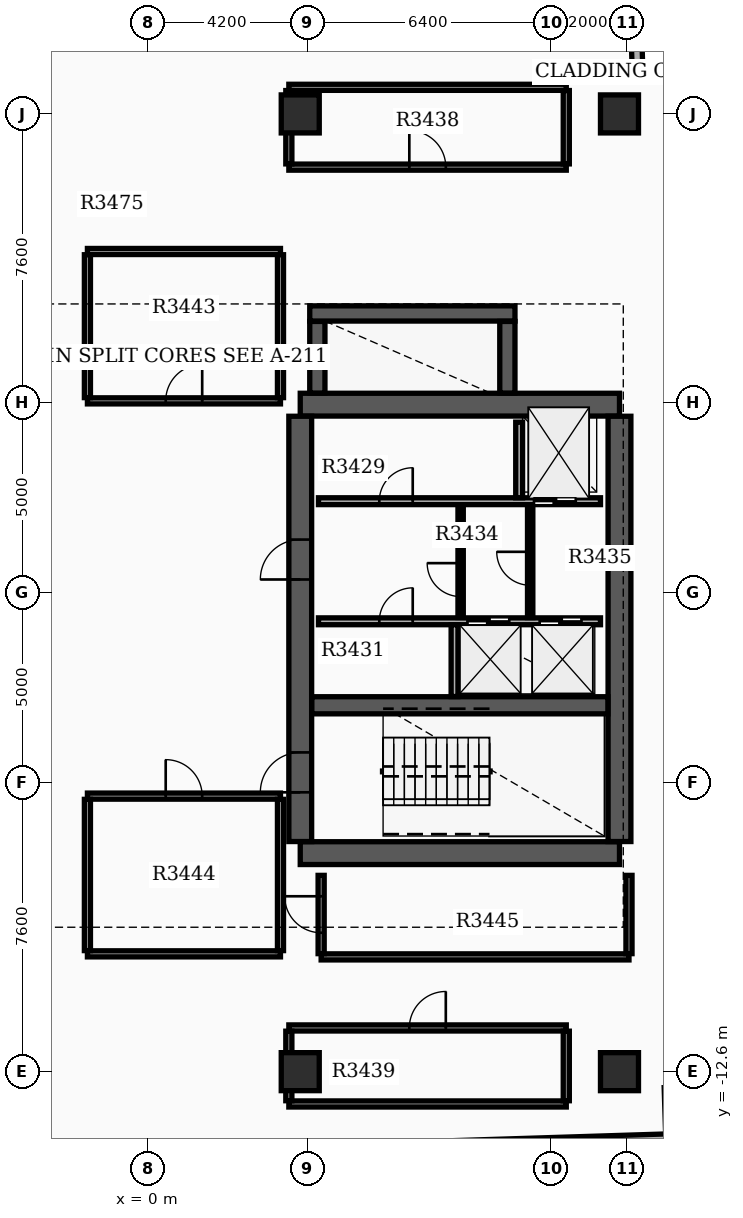
"""IFC4 building model, lengths in metres.
Left out: names, types, materials, properties, quantities, classifications, styles, units other than length and angle.
Written with IfcOpenShell. Run it as: python <this file> out.ifc"""

import sys

from ifc_helpers import new_model, si_unit, direction, frame, frame_2d, origin, origin_2d, place, context, subcontext, project, spatial, rectangle, extrude, element, fill, save


model = new_model("IFC4")
c1 = context("Model", 3, precision=1e-05, world=origin(), true_north=direction((0.0, 1.0)))
c2 = subcontext(c1, "Body", "Model", "MODEL_VIEW")
j1 = project(units=[si_unit("LENGTHUNIT", "METRE"), si_unit("PLANEANGLEUNIT", "RADIAN")], contexts=[c1])
p1 = place(None, origin())
s1 = spatial("IfcSite", under=j1, at=p1, CompositionType="ELEMENT")
p2 = place(p1, origin())
s2 = spatial("IfcBuilding", under=s1, at=p2, CompositionType="ELEMENT")
p3 = place(p2, frame((0.0, 0.0, 216.9)))
s3 = spatial("IfcBuildingStorey", under=s2, at=p3, CompositionType="ELEMENT", Elevation=216.9)
for number, where, z_axis, x_axis in (
    (1, (4.0, -6.85, 0.0), (0.0, 0.0, 1.0), (1.0, 0.0, 0.0)),
    (2, (4.0, 4.95, 0.0), (0.0, 0.0, 1.0), (1.0, 0.0, 0.0)),
):
    element("IfcWall", number, at=place(p3, frame(where, z_axis=z_axis, x_axis=x_axis)), inside=s3, PredefinedType="SHEAR", context=c2, shape_type="SweptSolid", body=[
        extrude(rectangle(XDim=8.4, YDim=0.6, at=frame_2d((4.2, 0.0))), origin(), (0.0, 0.0, 1.0), 3.7),
    ])
p4 = place(p3, frame((4.0, -6.545, 0.0), z_axis=(0.0, 0.0, 1.0), x_axis=(0.0, 1.0, 0.0)))
e3 = element("IfcWall", 3, at=p4, inside=s3, PredefinedType="SHEAR", context=c2, shape_type="SweptSolid", body=[
    extrude(rectangle(XDim=11.19, YDim=0.6, at=frame_2d((5.595, 0.0))), origin(), (0.0, 0.0, 1.0), 3.7),
])
p5 = place(p4, frame((1.295, 0.0, 0.0)))
e4 = element("IfcOpeningElement", 4, at=p5, cuts=e3, PredefinedType="OPENING", context=c2, shape_type="SweptSolid", body=[
    extrude(rectangle(XDim=1.05, YDim=2.15, at=frame_2d((0.525, 1.075))), frame((0.0, 0.31, 0.0), z_axis=(0.0, -1.0, 0.0), x_axis=(1.0, 0.0, 0.0)), (0.0, 0.0, 1.0), 0.62),
])
p6 = place(p4, frame((6.895, 0.0, 0.0)))
e5 = element("IfcOpeningElement", 5, at=p6, cuts=e3, PredefinedType="OPENING", context=c2, shape_type="SweptSolid", body=[
    extrude(rectangle(XDim=1.05, YDim=2.15, at=frame_2d((0.525, 1.075))), frame((0.0, 0.31, 0.0), z_axis=(0.0, -1.0, 0.0), x_axis=(1.0, 0.0, 0.0)), (0.0, 0.0, 1.0), 0.62),
])
p7 = place(p3, frame((12.4, -6.545, 0.0), z_axis=(0.0, 0.0, 1.0), x_axis=(0.0, 1.0, 0.0)))
e6 = element("IfcWall", 6, at=p7, inside=s3, PredefinedType="SHEAR", context=c2, shape_type="SweptSolid", body=[
    extrude(rectangle(XDim=11.19, YDim=0.6, at=frame_2d((5.595, 0.0))), origin(), (0.0, 0.0, 1.0), 3.7),
])
p8 = place(p3, frame((4.305, -2.96, 0.0), z_axis=(0.0, 0.0, 1.0), x_axis=(1.0, 0.0, 0.0)))
e7 = element("IfcWall", 7, at=p8, inside=s3, PredefinedType="SHEAR", context=c2, shape_type="SweptSolid", body=[
    extrude(rectangle(XDim=7.79, YDim=0.45, at=frame_2d((3.895, 0.0))), origin(), (0.0, 0.0, 1.0), 3.7),
])
p9 = place(p3, frame((4.45, 5.255, 0.0), z_axis=(0.0, 0.0, 1.0), x_axis=(0.0, 1.0, 0.0)))
e8 = element("IfcWall", 8, at=p9, inside=s3, PredefinedType="SHEAR", context=c2, shape_type="SweptSolid", body=[
    extrude(rectangle(XDim=1.885, YDim=0.4, at=frame_2d((0.942, 0.0))), origin(), (0.0, 0.0, 1.0), 3.7),
])
p10 = place(p3, frame((4.25, 7.35, 0.0), z_axis=(0.0, 0.0, 1.0), x_axis=(1.0, 0.0, 0.0)))
e9 = element("IfcWall", 9, at=p10, inside=s3, PredefinedType="SHEAR", context=c2, shape_type="SweptSolid", body=[
    extrude(rectangle(XDim=5.4, YDim=0.4, at=frame_2d((2.7, 0.0))), origin(), (0.0, 0.0, 1.0), 3.7),
])
p11 = place(p3, frame((9.45, 5.255, 0.0), z_axis=(0.0, 0.0, 1.0), x_axis=(0.0, 1.0, 0.0)))
e10 = element("IfcWall", 10, at=p11, inside=s3, PredefinedType="SHEAR", context=c2, shape_type="SweptSolid", body=[
    extrude(rectangle(XDim=1.885, YDim=0.4, at=frame_2d((0.942, 0.0))), origin(), (0.0, 0.0, 1.0), 3.7),
])
for number, where, z_axis, x_axis in (
    (11, (12.4, -12.6, 0.0), (0.0, 0.0, 1.0), (1.0, 0.0, 0.0)),
    (12, (12.4, 12.6, 0.0), (0.0, 0.0, 1.0), (1.0, 0.0, 0.0)),
    (13, (4.0, -12.6, 0.0), (0.0, 0.0, 1.0), (1.0, 0.0, 0.0)),
    (14, (4.0, 12.6, 0.0), (0.0, 0.0, 1.0), (1.0, 0.0, 0.0)),
):
    element("IfcColumn", number, at=place(p3, frame(where, z_axis=z_axis, x_axis=x_axis)), inside=s3, PredefinedType="COLUMN", context=c2, shape_type="SweptSolid", body=[
        extrude(rectangle(XDim=1.0, YDim=1.0, at=origin_2d()), origin(), (0.0, 0.0, 1.0), 3.9),
    ])
p12 = place(p3, frame((14.235, 13.754, 0.0), z_axis=(0.0, 0.0, 1.0), x_axis=(-0.999506398264, -0.031415916822, 0.0)))
e15 = element("IfcWall", 15, at=p12, inside=s3, PredefinedType="STANDARD", context=c2, shape_type="SweptSolid", body=[
    extrude(rectangle(XDim=1.22, YDim=0.28, at=frame_2d((0.61, 0.0))), origin(), (0.0, 0.0, 1.0), 3.18),
])
p13 = place(p3, frame((12.871, 13.851, 0.0), z_axis=(0.0, 0.0, 1.0), x_axis=(-0.031412596484, 0.999506502621, 0.0)))
e16 = element("IfcWall", 16, at=p13, inside=s3, PredefinedType="STANDARD", context=c2, shape_type="SweptSolid", body=[
    extrude(rectangle(XDim=1.5, YDim=0.28, at=frame_2d((0.75, 0.0))), origin(), (0.0, 0.0, 1.0), 3.18),
])
p14 = place(p3, frame((13.618, -14.379, 0.0), z_axis=(0.0, 0.0, 1.0), x_axis=(-0.999507224741, -0.031389611199, 0.0)))
e17 = element("IfcWall", 17, at=p14, inside=s3, PredefinedType="STANDARD", context=c2, shape_type="SweptSolid", body=[
    extrude(rectangle(XDim=6.3, YDim=0.28, at=frame_2d((3.15, 0.0))), origin(), (0.0, 0.0, 1.0), 3.18),
])
p15 = place(p3, frame((4.48, 2.41, 0.0), z_axis=(0.0, 0.0, 1.0), x_axis=(1.0, 0.0, 0.0)))
e18 = element("IfcWall", 18, at=p15, inside=s3, PredefinedType="SOLIDWALL", context=c2, shape_type="SweptSolid", body=[
    extrude(rectangle(XDim=7.42, YDim=0.18, at=frame_2d((3.71, 0.0))), origin(), (0.0, 0.0, 1.0), 3.17),
])
p16 = place(p15, frame((5.67, 0.0, 0.0)))
e19 = element("IfcOpeningElement", 19, at=p16, cuts=e18, PredefinedType="OPENING", context=c2, shape_type="SweptSolid", body=[
    extrude(rectangle(XDim=1.1, YDim=2.15, at=frame_2d((0.55, 1.075))), frame((0.0, 0.1, 0.0), z_axis=(0.0, -1.0, 0.0), x_axis=(1.0, 0.0, 0.0)), (0.0, 0.0, 1.0), 0.2),
])
p17 = place(p15, frame((1.6, 0.0, 0.0)))
e20 = element("IfcOpeningElement", 20, at=p17, cuts=e18, PredefinedType="OPENING", context=c2, shape_type="SweptSolid", body=[
    extrude(rectangle(XDim=0.88, YDim=2.1, at=frame_2d((0.44, 1.05))), frame((0.0, 0.1, 0.0), z_axis=(0.0, -1.0, 0.0), x_axis=(1.0, 0.0, 0.0)), (0.0, 0.0, 1.0), 0.2),
])
p18 = place(p3, frame((4.48, -0.75, 0.0), z_axis=(0.0, 0.0, 1.0), x_axis=(1.0, 0.0, 0.0)))
e21 = element("IfcWall", 21, at=p18, inside=s3, PredefinedType="SOLIDWALL", context=c2, shape_type="SweptSolid", body=[
    extrude(rectangle(XDim=7.42, YDim=0.18, at=frame_2d((3.71, 0.0))), origin(), (0.0, 0.0, 1.0), 3.17),
])
p19 = place(p18, frame((3.92, 0.0, 0.0)))
e22 = element("IfcOpeningElement", 22, at=p19, cuts=e21, PredefinedType="OPENING", context=c2, shape_type="SweptSolid", body=[
    extrude(rectangle(XDim=1.1, YDim=2.15, at=frame_2d((0.55, 1.075))), frame((0.0, 0.1, 0.0), z_axis=(0.0, -1.0, 0.0), x_axis=(1.0, 0.0, 0.0)), (0.0, 0.0, 1.0), 0.2),
])
p20 = place(p18, frame((5.82, 0.0, 0.0)))
e23 = element("IfcOpeningElement", 23, at=p20, cuts=e21, PredefinedType="OPENING", context=c2, shape_type="SweptSolid", body=[
    extrude(rectangle(XDim=1.1, YDim=2.15, at=frame_2d((0.55, 1.075))), frame((0.0, 0.1, 0.0), z_axis=(0.0, -1.0, 0.0), x_axis=(1.0, 0.0, 0.0)), (0.0, 0.0, 1.0), 0.2),
])
p21 = place(p18, frame((1.6, 0.0, 0.0)))
e24 = element("IfcOpeningElement", 24, at=p21, cuts=e21, PredefinedType="OPENING", context=c2, shape_type="SweptSolid", body=[
    extrude(rectangle(XDim=0.88, YDim=2.1, at=frame_2d((0.44, 1.05))), frame((0.0, 0.1, 0.0), z_axis=(0.0, -1.0, 0.0), x_axis=(1.0, 0.0, 0.0)), (0.0, 0.0, 1.0), 0.2),
])
p22 = place(p3, frame((9.76, 2.5, 0.0), z_axis=(0.0, 0.0, 1.0), x_axis=(0.0, 1.0, 0.0)))
e25 = element("IfcWall", 25, at=p22, inside=s3, PredefinedType="SOLIDWALL", context=c2, shape_type="SweptSolid", body=[
    extrude(rectangle(XDim=1.99, YDim=0.18, at=frame_2d((0.995, 0.0))), origin(), (0.0, 0.0, 1.0), 3.17),
])
p23 = place(p3, frame((8.06, -2.73, 0.0), z_axis=(0.0, 0.0, 1.0), x_axis=(0.0, 1.0, 0.0)))
e26 = element("IfcWall", 26, at=p23, inside=s3, PredefinedType="SOLIDWALL", context=c2, shape_type="SweptSolid", body=[
    extrude(rectangle(XDim=1.89, YDim=0.18, at=frame_2d((0.945, 0.0))), origin(), (0.0, 0.0, 1.0), 3.17),
])
p24 = place(p3, frame((8.22, -0.65, 0.0), z_axis=(0.0, 0.0, 1.0), x_axis=(0.0, 1.0, 0.0)))
e27 = element("IfcWall", 27, at=p24, inside=s3, PredefinedType="SOLIDWALL", context=c2, shape_type="SweptSolid", body=[
    extrude(rectangle(XDim=2.96, YDim=0.14, at=frame_2d((1.48, 0.0))), origin(), (0.0, 0.0, 1.0), 3.17),
])
p25 = place(p24, frame((0.55, 0.0, 0.0)))
e28 = element("IfcOpeningElement", 28, at=p25, cuts=e27, PredefinedType="OPENING", context=c2, shape_type="SweptSolid", body=[
    extrude(rectangle(XDim=0.88, YDim=2.1, at=frame_2d((0.44, 1.05))), frame((0.0, 0.08, 0.0), z_axis=(0.0, -1.0, 0.0), x_axis=(1.0, 0.0, 0.0)), (0.0, 0.0, 1.0), 0.16),
])
p26 = place(p3, frame((10.05, -0.652, 0.0), z_axis=(0.0, 0.0, 1.0), x_axis=(0.0, 1.0, 0.0)))
e29 = element("IfcWall", 29, at=p26, inside=s3, PredefinedType="PARTITIONING", context=c2, shape_type="SweptSolid", body=[
    extrude(rectangle(XDim=2.962, YDim=0.14, at=frame_2d((1.481, 0.0))), origin(), (0.0, 0.0, 1.0), 3.17),
])
p27 = place(p26, frame((0.85, 0.0, 0.0)))
e30 = element("IfcOpeningElement", 30, at=p27, cuts=e29, PredefinedType="OPENING", context=c2, shape_type="SweptSolid", body=[
    extrude(rectangle(XDim=0.88, YDim=2.1, at=frame_2d((0.44, 1.05))), frame((0.0, 0.08, 0.0), z_axis=(0.0, -1.0, 0.0), x_axis=(1.0, 0.0, 0.0)), (0.0, 0.0, 1.0), 0.16),
])
p28 = place(p3, frame((3.7, 11.2, 0.0), z_axis=(0.0, 0.0, 1.0), x_axis=(1.0, 0.0, 0.0)))
e31 = element("IfcWall", 31, at=p28, inside=s3, PredefinedType="PARTITIONING", context=c2, shape_type="SweptSolid", body=[
    extrude(rectangle(XDim=7.3, YDim=0.16, at=frame_2d((3.65, 0.0))), origin(), (0.0, 0.0, 1.0), 3.17),
])
p29 = place(p28, frame((3.17, 0.0, 0.0)))
e32 = element("IfcOpeningElement", 32, at=p29, cuts=e31, PredefinedType="OPENING", context=c2, shape_type="SweptSolid", body=[
    extrude(rectangle(XDim=0.96, YDim=2.15, at=frame_2d((0.48, 1.075))), frame((0.0, 0.09, 0.0), z_axis=(0.0, -1.0, 0.0), x_axis=(1.0, 0.0, 0.0)), (0.0, 0.0, 1.0), 0.18),
])
p30 = place(p3, frame((3.7, 13.3, 0.0), z_axis=(0.0, 0.0, 1.0), x_axis=(1.0, 0.0, 0.0)))
e33 = element("IfcWall", 33, at=p30, inside=s3, PredefinedType="PARTITIONING", context=c2, shape_type="SweptSolid", body=[
    extrude(rectangle(XDim=7.3, YDim=0.16, at=frame_2d((3.65, 0.0))), origin(), (0.0, 0.0, 1.0), 3.17),
])
for number, where, z_axis, x_axis in (
    (34, (3.7, 11.285, 0.0), (0.0, 0.0, 1.0), (0.0, 1.0, 0.0)),
    (35, (11.0, 11.285, 0.0), (0.0, 0.0, 1.0), (0.0, 1.0, 0.0)),
):
    element("IfcWall", number, at=place(p3, frame(where, z_axis=z_axis, x_axis=x_axis)), inside=s3, PredefinedType="PARTITIONING", context=c2, shape_type="SweptSolid", body=[
        extrude(rectangle(XDim=1.93, YDim=0.16, at=frame_2d((0.965, 0.0))), origin(), (0.0, 0.0, 1.0), 3.17),
    ])
p31 = place(p3, frame((3.7, -13.45, 0.0), z_axis=(0.0, 0.0, 1.0), x_axis=(1.0, 0.0, 0.0)))
e36 = element("IfcWall", 36, at=p31, inside=s3, PredefinedType="PARTITIONING", context=c2, shape_type="SweptSolid", body=[
    extrude(rectangle(XDim=7.3, YDim=0.16, at=frame_2d((3.65, 0.0))), origin(), (0.0, 0.0, 1.0), 3.17),
])
p32 = place(p3, frame((3.7, -11.45, 0.0), z_axis=(0.0, 0.0, 1.0), x_axis=(1.0, 0.0, 0.0)))
e37 = element("IfcWall", 37, at=p32, inside=s3, PredefinedType="PARTITIONING", context=c2, shape_type="SweptSolid", body=[
    extrude(rectangle(XDim=7.3, YDim=0.16, at=frame_2d((3.65, 0.0))), origin(), (0.0, 0.0, 1.0), 3.17),
])
p33 = place(p32, frame((3.17, 0.0, 0.0)))
e38 = element("IfcOpeningElement", 38, at=p33, cuts=e37, PredefinedType="OPENING", context=c2, shape_type="SweptSolid", body=[
    extrude(rectangle(XDim=0.96, YDim=2.15, at=frame_2d((0.48, 1.075))), frame((0.0, 0.09, 0.0), z_axis=(0.0, -1.0, 0.0), x_axis=(1.0, 0.0, 0.0)), (0.0, 0.0, 1.0), 0.18),
])
for number, where, z_axis, x_axis in (
    (39, (3.7, -13.365, 0.0), (0.0, 0.0, 1.0), (0.0, 1.0, 0.0)),
    (40, (11.0, -13.365, 0.0), (0.0, 0.0, 1.0), (0.0, 1.0, 0.0)),
):
    element("IfcWall", number, at=place(p3, frame(where, z_axis=z_axis, x_axis=x_axis)), inside=s3, PredefinedType="PARTITIONING", context=c2, shape_type="SweptSolid", body=[
        extrude(rectangle(XDim=1.83, YDim=0.16, at=frame_2d((0.915, 0.0))), origin(), (0.0, 0.0, 1.0), 3.17),
    ])
p34 = place(p3, frame((-1.6, 5.05, 0.0), z_axis=(0.0, 0.0, 1.0), x_axis=(1.0, 0.0, 0.0)))
e41 = element("IfcWall", 41, at=p34, inside=s3, PredefinedType="PARTITIONING", context=c2, shape_type="SweptSolid", body=[
    extrude(rectangle(XDim=5.08, YDim=0.16, at=frame_2d((2.54, 0.0))), origin(), (0.0, 0.0, 1.0), 3.17),
])
p35 = place(p34, frame((2.06, 0.0, 0.0)))
e42 = element("IfcOpeningElement", 42, at=p35, cuts=e41, PredefinedType="OPENING", context=c2, shape_type="SweptSolid", body=[
    extrude(rectangle(XDim=0.96, YDim=2.15, at=frame_2d((0.48, 1.075))), frame((0.0, 0.09, 0.0), z_axis=(0.0, -1.0, 0.0), x_axis=(1.0, 0.0, 0.0)), (0.0, 0.0, 1.0), 0.18),
])
p36 = place(p3, frame((-1.6, 8.98, 0.0), z_axis=(0.0, 0.0, 1.0), x_axis=(1.0, 0.0, 0.0)))
e43 = element("IfcWall", 43, at=p36, inside=s3, PredefinedType="PARTITIONING", context=c2, shape_type="SweptSolid", body=[
    extrude(rectangle(XDim=5.08, YDim=0.16, at=frame_2d((2.54, 0.0))), origin(), (0.0, 0.0, 1.0), 3.17),
])
for number, where, z_axis, x_axis in (
    (44, (-1.6, 5.135, 0.0), (0.0, 0.0, 1.0), (0.0, 1.0, 0.0)),
    (45, (3.48, 5.135, 0.0), (0.0, 0.0, 1.0), (0.0, 1.0, 0.0)),
):
    element("IfcWall", number, at=place(p3, frame(where, z_axis=z_axis, x_axis=x_axis)), inside=s3, PredefinedType="PARTITIONING", context=c2, shape_type="SweptSolid", body=[
        extrude(rectangle(XDim=3.76, YDim=0.16, at=frame_2d((1.88, 0.0))), origin(), (0.0, 0.0, 1.0), 3.17),
    ])
p37 = place(p3, frame((-1.6, -9.5, 0.0), z_axis=(0.0, 0.0, 1.0), x_axis=(1.0, 0.0, 0.0)))
e46 = element("IfcWall", 46, at=p37, inside=s3, PredefinedType="PARTITIONING", context=c2, shape_type="SweptSolid", body=[
    extrude(rectangle(XDim=5.08, YDim=0.16, at=frame_2d((2.54, 0.0))), origin(), (0.0, 0.0, 1.0), 3.17),
])
p38 = place(p3, frame((-1.6, -5.35, 0.0), z_axis=(0.0, 0.0, 1.0), x_axis=(1.0, 0.0, 0.0)))
e47 = element("IfcWall", 47, at=p38, inside=s3, PredefinedType="PARTITIONING", context=c2, shape_type="SweptSolid", body=[
    extrude(rectangle(XDim=5.08, YDim=0.16, at=frame_2d((2.54, 0.0))), origin(), (0.0, 0.0, 1.0), 3.17),
])
p39 = place(p38, frame((2.06, 0.0, 0.0)))
e48 = element("IfcOpeningElement", 48, at=p39, cuts=e47, PredefinedType="OPENING", context=c2, shape_type="SweptSolid", body=[
    extrude(rectangle(XDim=0.96, YDim=2.15, at=frame_2d((0.48, 1.075))), frame((0.0, 0.09, 0.0), z_axis=(0.0, -1.0, 0.0), x_axis=(1.0, 0.0, 0.0)), (0.0, 0.0, 1.0), 0.18),
])
for number, where, z_axis, x_axis in (
    (49, (-1.6, -9.415, 0.0), (0.0, 0.0, 1.0), (0.0, 1.0, 0.0)),
    (50, (3.48, -9.415, 0.0), (0.0, 0.0, 1.0), (0.0, 1.0, 0.0)),
):
    element("IfcWall", number, at=place(p3, frame(where, z_axis=z_axis, x_axis=x_axis)), inside=s3, PredefinedType="PARTITIONING", context=c2, shape_type="SweptSolid", body=[
        extrude(rectangle(XDim=3.98, YDim=0.16, at=frame_2d((1.99, 0.0))), origin(), (0.0, 0.0, 1.0), 3.17),
    ])
p40 = place(p3, frame((4.55, -9.58, 0.0), z_axis=(0.0, 0.0, 1.0), x_axis=(1.0, 0.0, 0.0)))
e51 = element("IfcWall", 51, at=p40, inside=s3, PredefinedType="PARTITIONING", context=c2, shape_type="SweptSolid", body=[
    extrude(rectangle(XDim=8.1, YDim=0.16, at=frame_2d((4.05, 0.0))), origin(), (0.0, 0.0, 1.0), 3.17),
])
p41 = place(p3, frame((4.55, -9.495, 0.0), z_axis=(0.0, 0.0, 1.0), x_axis=(0.0, 1.0, 0.0)))
e52 = element("IfcWall", 52, at=p41, inside=s3, PredefinedType="PARTITIONING", context=c2, shape_type="SweptSolid", body=[
    extrude(rectangle(XDim=2.06, YDim=0.16, at=frame_2d((1.03, 0.0))), origin(), (0.0, 0.0, 1.0), 3.17),
])
p42 = place(p41, frame((0.55, 0.0, 0.0)))
e53 = element("IfcOpeningElement", 53, at=p42, cuts=e52, PredefinedType="OPENING", context=c2, shape_type="SweptSolid", body=[
    extrude(rectangle(XDim=0.96, YDim=2.15, at=frame_2d((0.48, 1.075))), frame((0.0, 0.09, 0.0), z_axis=(0.0, -1.0, 0.0), x_axis=(1.0, 0.0, 0.0)), (0.0, 0.0, 1.0), 0.18),
])
p43 = place(p3, frame((12.65, -9.495, 0.0), z_axis=(0.0, 0.0, 1.0), x_axis=(0.0, 1.0, 0.0)))
e54 = element("IfcWall", 54, at=p43, inside=s3, PredefinedType="PARTITIONING", context=c2, shape_type="SweptSolid", body=[
    extrude(rectangle(XDim=2.06, YDim=0.16, at=frame_2d((1.03, 0.0))), origin(), (0.0, 0.0, 1.0), 3.17),
])
p44 = place(p5, origin())
e55 = element("IfcDoor", 55, at=p44, inside=s3, OperationType="SINGLE_SWING_LEFT", PredefinedType="DOOR", context=c2, shape_type="SweptSolid", body=[
    extrude(rectangle(XDim=1.05, YDim=2.15, at=frame_2d((0.525, 1.075))), frame((0.0, 0.025, 0.0), z_axis=(0.0, -1.0, 0.0), x_axis=(1.0, 0.0, 0.0)), (0.0, 0.0, 1.0), 0.05),
])
fill(e4, e55)
p45 = place(p6, origin())
e56 = element("IfcDoor", 56, at=p45, inside=s3, OperationType="SINGLE_SWING_LEFT", PredefinedType="DOOR", context=c2, shape_type="SweptSolid", body=[
    extrude(rectangle(XDim=1.05, YDim=2.15, at=frame_2d((0.525, 1.075))), frame((0.0, 0.025, 0.0), z_axis=(0.0, -1.0, 0.0), x_axis=(1.0, 0.0, 0.0)), (0.0, 0.0, 1.0), 0.05),
])
fill(e5, e56)
p46 = place(p16, origin())
e57 = element("IfcDoor", 57, at=p46, inside=s3, OperationType="DOUBLE_DOOR_SLIDING", PredefinedType="DOOR", context=c2, shape_type="SweptSolid", body=[
    extrude(rectangle(XDim=1.1, YDim=2.15, at=frame_2d((0.55, 1.075))), frame((0.0, 0.025, 0.0), z_axis=(0.0, -1.0, 0.0), x_axis=(1.0, 0.0, 0.0)), (0.0, 0.0, 1.0), 0.05),
])
fill(e19, e57)
p47 = place(p19, origin())
e58 = element("IfcDoor", 58, at=p47, inside=s3, OperationType="DOUBLE_DOOR_SLIDING", PredefinedType="DOOR", context=c2, shape_type="SweptSolid", body=[
    extrude(rectangle(XDim=1.1, YDim=2.15, at=frame_2d((0.55, 1.075))), frame((0.0, 0.025, 0.0), z_axis=(0.0, -1.0, 0.0), x_axis=(1.0, 0.0, 0.0)), (0.0, 0.0, 1.0), 0.05),
])
fill(e22, e58)
p48 = place(p20, origin())
e59 = element("IfcDoor", 59, at=p48, inside=s3, OperationType="DOUBLE_DOOR_SLIDING", PredefinedType="DOOR", context=c2, shape_type="SweptSolid", body=[
    extrude(rectangle(XDim=1.1, YDim=2.15, at=frame_2d((0.55, 1.075))), frame((0.0, 0.025, 0.0), z_axis=(0.0, -1.0, 0.0), x_axis=(1.0, 0.0, 0.0)), (0.0, 0.0, 1.0), 0.05),
])
fill(e23, e59)
p49 = place(p17, origin())
e60 = element("IfcDoor", 60, at=p49, inside=s3, OperationType="SINGLE_SWING_RIGHT", PredefinedType="DOOR", context=c2, shape_type="SweptSolid", body=[
    extrude(rectangle(XDim=0.88, YDim=2.1, at=frame_2d((0.44, 1.05))), frame((0.0, 0.025, 0.0), z_axis=(0.0, -1.0, 0.0), x_axis=(1.0, 0.0, 0.0)), (0.0, 0.0, 1.0), 0.05),
])
fill(e20, e60)
p50 = place(p21, origin())
e61 = element("IfcDoor", 61, at=p50, inside=s3, OperationType="SINGLE_SWING_RIGHT", PredefinedType="DOOR", context=c2, shape_type="SweptSolid", body=[
    extrude(rectangle(XDim=0.88, YDim=2.1, at=frame_2d((0.44, 1.05))), frame((0.0, 0.025, 0.0), z_axis=(0.0, -1.0, 0.0), x_axis=(1.0, 0.0, 0.0)), (0.0, 0.0, 1.0), 0.05),
])
fill(e24, e61)
p51 = place(p25, origin())
e62 = element("IfcDoor", 62, at=p51, inside=s3, OperationType="SINGLE_SWING_RIGHT", PredefinedType="DOOR", context=c2, shape_type="SweptSolid", body=[
    extrude(rectangle(XDim=0.88, YDim=2.1, at=frame_2d((0.44, 1.05))), frame((0.0, 0.025, 0.0), z_axis=(0.0, -1.0, 0.0), x_axis=(1.0, 0.0, 0.0)), (0.0, 0.0, 1.0), 0.05),
])
fill(e28, e62)
p52 = place(p27, origin())
e63 = element("IfcDoor", 63, at=p52, inside=s3, OperationType="SINGLE_SWING_RIGHT", PredefinedType="DOOR", context=c2, shape_type="SweptSolid", body=[
    extrude(rectangle(XDim=0.88, YDim=2.1, at=frame_2d((0.44, 1.05))), frame((0.0, 0.025, 0.0), z_axis=(0.0, -1.0, 0.0), x_axis=(1.0, 0.0, 0.0)), (0.0, 0.0, 1.0), 0.05),
])
fill(e30, e63)
p53 = place(p29, origin())
e64 = element("IfcDoor", 64, at=p53, inside=s3, OperationType="SINGLE_SWING_LEFT", PredefinedType="DOOR", context=c2, shape_type="SweptSolid", body=[
    extrude(rectangle(XDim=0.96, YDim=2.15, at=frame_2d((0.48, 1.075))), frame((0.0, 0.025, 0.0), z_axis=(0.0, -1.0, 0.0), x_axis=(1.0, 0.0, 0.0)), (0.0, 0.0, 1.0), 0.05),
])
fill(e32, e64)
p54 = place(p33, origin())
e65 = element("IfcDoor", 65, at=p54, inside=s3, OperationType="SINGLE_SWING_RIGHT", PredefinedType="DOOR", context=c2, shape_type="SweptSolid", body=[
    extrude(rectangle(XDim=0.96, YDim=2.15, at=frame_2d((0.48, 1.075))), frame((0.0, 0.025, 0.0), z_axis=(0.0, -1.0, 0.0), x_axis=(1.0, 0.0, 0.0)), (0.0, 0.0, 1.0), 0.05),
])
fill(e38, e65)
p55 = place(p35, origin())
e66 = element("IfcDoor", 66, at=p55, inside=s3, OperationType="SINGLE_SWING_RIGHT", PredefinedType="DOOR", context=c2, shape_type="SweptSolid", body=[
    extrude(rectangle(XDim=0.96, YDim=2.15, at=frame_2d((0.48, 1.075))), frame((0.0, 0.025, 0.0), z_axis=(0.0, -1.0, 0.0), x_axis=(1.0, 0.0, 0.0)), (0.0, 0.0, 1.0), 0.05),
])
fill(e42, e66)
p56 = place(p39, origin())
e67 = element("IfcDoor", 67, at=p56, inside=s3, OperationType="SINGLE_SWING_LEFT", PredefinedType="DOOR", context=c2, shape_type="SweptSolid", body=[
    extrude(rectangle(XDim=0.96, YDim=2.15, at=frame_2d((0.48, 1.075))), frame((0.0, 0.025, 0.0), z_axis=(0.0, -1.0, 0.0), x_axis=(1.0, 0.0, 0.0)), (0.0, 0.0, 1.0), 0.05),
])
fill(e48, e67)
p57 = place(p42, origin())
e68 = element("IfcDoor", 68, at=p57, inside=s3, OperationType="SINGLE_SWING_RIGHT", PredefinedType="DOOR", context=c2, shape_type="SweptSolid", body=[
    extrude(rectangle(XDim=0.96, YDim=2.15, at=frame_2d((0.48, 1.075))), frame((0.0, 0.025, 0.0), z_axis=(0.0, -1.0, 0.0), x_axis=(1.0, 0.0, 0.0)), (0.0, 0.0, 1.0), 0.05),
])
fill(e53, e68)
save(model, sys.argv[1])
